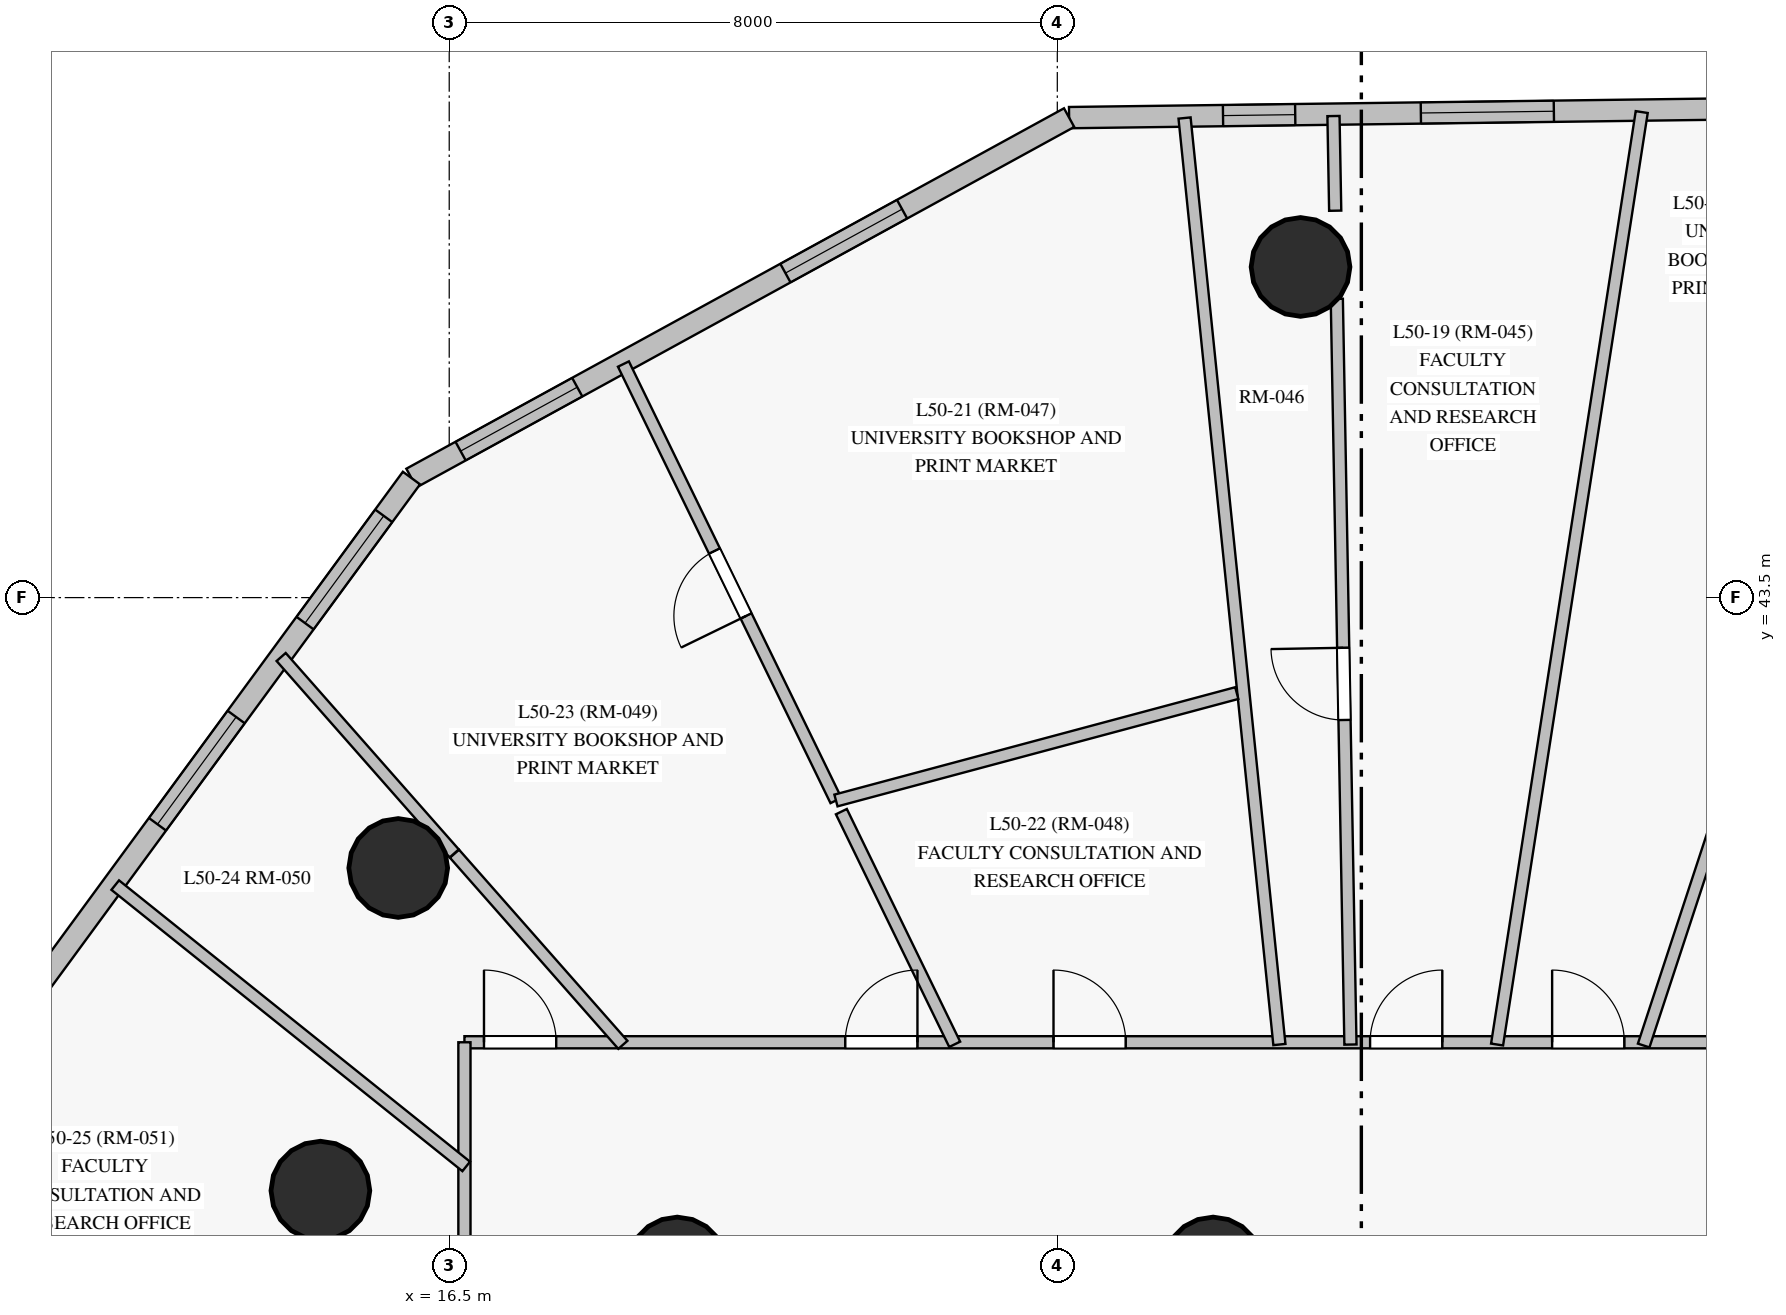
"""IFC4 building model, lengths in metres.
Left out: names, types, materials, properties, quantities, classifications, styles, units other than length and angle.
Written with IfcOpenShell. Run it as: python <this file> out.ifc"""

import sys

from ifc_helpers import new_model, si_unit, direction, frame, frame_2d, origin, origin_with_axes, origin_2d, place, context, subcontext, project, spatial, rectangle, circle, extrude, source, transform, mapped, element, fill, save


model = new_model("IFC4")
c1 = context("Model", 3, precision=1e-05, world=origin(), true_north=direction((0.0, 1.0)))
c2 = subcontext(c1, "Body", "Model", "MODEL_VIEW")
j1 = project(units=[si_unit("LENGTHUNIT", "METRE"), si_unit("PLANEANGLEUNIT", "RADIAN")], contexts=[c1])
p1 = place(None, origin())
s1 = spatial("IfcSite", under=j1, at=p1, CompositionType="ELEMENT")
p2 = place(p1, origin())
s2 = spatial("IfcBuilding", under=s1, at=p2, CompositionType="ELEMENT")
p3 = place(p2, frame((0.0, 0.0, 174.85)))
s3 = spatial("IfcBuildingStorey", under=s2, at=p3, CompositionType="ELEMENT", Elevation=174.85)
m1 = source(origin_with_axes(), c2, "Body", "SweptSolid", [
    extrude(circle(Radius=0.65, at=origin_2d()), origin(), (0.0, 0.0, 1.0), 3.05),
])
for number, where, z_axis, x_axis in (
    (1, (19.5, 34.7, 0.0), (0.0, 0.0, 1.0), (1.0, 0.0, 0.0)),
    (2, (26.55, 34.7, 0.0), (0.0, 0.0, 1.0), (1.0, 0.0, 0.0)),
    (3, (27.7, 47.85, 0.0), (0.0, 0.0, 1.0), (1.0, 0.0, 0.0)),
    (4, (15.829, 39.943, 0.0), (0.0, 0.0, 1.0), (1.0, 0.0, 0.0)),
    (5, (14.805, 35.698, 0.0), (0.0, 0.0, 1.0), (1.0, 0.0, 0.0)),
):
    element("IfcColumn", number, at=place(p3, frame(where, z_axis=z_axis, x_axis=x_axis)), inside=s3, PredefinedType="COLUMN", context=c2, shape_type="MappedRepresentation", body=[
        mapped(m1, transform((0.0, 0.0, 0.0), scale=1.0)),
    ])
p4 = place(p3, frame((37.189, 49.979, 0.0), z_axis=(0.0, 0.0, 1.0), x_axis=(-0.999913830064, -0.013127545317, 0.0)))
e6 = element("IfcWall", 6, at=p4, inside=s3, PredefinedType="SOLIDWALL", context=c2, shape_type="SweptSolid", body=[
    extrude(rectangle(XDim=12.535, YDim=0.28, at=frame_2d((6.267, 0.0))), origin(), (0.0, 0.0, 1.0), 2.825),
])
p5 = place(p4, frame((2.095, 0.0, 0.85)))
e7 = element("IfcOpeningElement", 7, at=p5, cuts=e6, PredefinedType="OPENING", context=c2, shape_type="SweptSolid", body=[
    extrude(rectangle(XDim=1.75, YDim=1.65, at=frame_2d((0.875, 0.825))), frame((0.0, 0.15, 0.0), z_axis=(0.0, -1.0, 0.0), x_axis=(1.0, 0.0, 0.0)), (0.0, 0.0, 1.0), 0.3),
])
p6 = place(p4, frame((6.157, 0.0, 0.85)))
e8 = element("IfcOpeningElement", 8, at=p6, cuts=e6, PredefinedType="OPENING", context=c2, shape_type="SweptSolid", body=[
    extrude(rectangle(XDim=1.75, YDim=1.65, at=frame_2d((0.875, 0.825))), frame((0.0, 0.15, 0.0), z_axis=(0.0, -1.0, 0.0), x_axis=(1.0, 0.0, 0.0)), (0.0, 0.0, 1.0), 0.3),
])
p7 = place(p4, frame((9.56, 0.0, 0.85)))
e9 = element("IfcOpeningElement", 9, at=p7, cuts=e6, PredefinedType="OPENING", context=c2, shape_type="SweptSolid", body=[
    extrude(rectangle(XDim=0.95, YDim=1.5, at=frame_2d((0.475, 0.75))), frame((0.0, 0.15, 0.0), z_axis=(0.0, -1.0, 0.0), x_axis=(1.0, 0.0, 0.0)), (0.0, 0.0, 1.0), 0.3),
])
p8 = place(p3, frame((24.656, 49.815, 0.0), z_axis=(0.0, 0.0, 1.0), x_axis=(-0.876946311872, -0.480588354097, 0.0)))
e10 = element("IfcWall", 10, at=p8, inside=s3, PredefinedType="SOLIDWALL", context=c2, shape_type="SweptSolid", body=[
    extrude(rectangle(XDim=9.866, YDim=0.28, at=frame_2d((4.933, 0.0))), origin(), (0.0, 0.0, 1.0), 2.825),
])
p9 = place(p8, frame((2.506, 0.0, 0.85)))
e11 = element("IfcOpeningElement", 11, at=p9, cuts=e10, PredefinedType="OPENING", context=c2, shape_type="SweptSolid", body=[
    extrude(rectangle(XDim=1.75, YDim=1.65, at=frame_2d((0.875, 0.825))), frame((0.0, 0.15, 0.0), z_axis=(0.0, -1.0, 0.0), x_axis=(1.0, 0.0, 0.0)), (0.0, 0.0, 1.0), 0.3),
])
p10 = place(p8, frame((7.379, 0.0, 0.85)))
e12 = element("IfcOpeningElement", 12, at=p10, cuts=e10, PredefinedType="OPENING", context=c2, shape_type="SweptSolid", body=[
    extrude(rectangle(XDim=1.75, YDim=1.65, at=frame_2d((0.875, 0.825))), frame((0.0, 0.15, 0.0), z_axis=(0.0, -1.0, 0.0), x_axis=(1.0, 0.0, 0.0)), (0.0, 0.0, 1.0), 0.3),
])
p11 = place(p3, frame((16.003, 45.073, 0.0), z_axis=(0.0, 0.0, 1.0), x_axis=(-0.591484690677, -0.806316228718, 0.0)))
e13 = element("IfcWall", 13, at=p11, inside=s3, PredefinedType="SOLIDWALL", context=c2, shape_type="SweptSolid", body=[
    extrude(rectangle(XDim=13.904, YDim=0.28, at=frame_2d((6.952, 0.0))), origin(), (0.0, 0.0, 1.0), 2.825),
])
p12 = place(p11, frame((0.617, 0.0, 0.85)))
e14 = element("IfcOpeningElement", 14, at=p12, cuts=e13, PredefinedType="OPENING", context=c2, shape_type="SweptSolid", body=[
    extrude(rectangle(XDim=1.75, YDim=1.65, at=frame_2d((0.875, 0.825))), frame((0.0, 0.15, 0.0), z_axis=(0.0, -1.0, 0.0), x_axis=(1.0, 0.0, 0.0)), (0.0, 0.0, 1.0), 0.3),
])
p13 = place(p11, frame((3.899, 0.0, 0.85)))
e15 = element("IfcOpeningElement", 15, at=p13, cuts=e13, PredefinedType="OPENING", context=c2, shape_type="SweptSolid", body=[
    extrude(rectangle(XDim=1.75, YDim=1.65, at=frame_2d((0.875, 0.825))), frame((0.0, 0.15, 0.0), z_axis=(0.0, -1.0, 0.0), x_axis=(1.0, 0.0, 0.0)), (0.0, 0.0, 1.0), 0.3),
])
p14 = place(p11, frame((8.644, 0.0, 0.85)))
e16 = element("IfcOpeningElement", 16, at=p14, cuts=e13, PredefinedType="OPENING", context=c2, shape_type="SweptSolid", body=[
    extrude(rectangle(XDim=1.75, YDim=1.65, at=frame_2d((0.875, 0.825))), frame((0.0, 0.15, 0.0), z_axis=(0.0, -1.0, 0.0), x_axis=(1.0, 0.0, 0.0)), (0.0, 0.0, 1.0), 0.3),
])
p15 = place(p3, frame((16.7, 37.65, 0.0), z_axis=(0.0, 0.0, 1.0), x_axis=(1.0, 0.0, 0.0)))
e17 = element("IfcWall", 17, at=p15, inside=s3, PredefinedType="PARTITIONING", context=c2, shape_type="SweptSolid", body=[
    extrude(rectangle(XDim=23.5, YDim=0.16, at=frame_2d((11.75, 0.0))), origin(), (0.0, 0.0, 1.0), 2.375),
])
p16 = place(p15, frame((17.15, 0.0, 0.0)))
e18 = element("IfcOpeningElement", 18, at=p16, cuts=e17, PredefinedType="OPENING", context=c2, shape_type="SweptSolid", body=[
    extrude(rectangle(XDim=0.95, YDim=2.15, at=frame_2d((0.475, 1.075))), frame((0.0, 0.09, 0.0), z_axis=(0.0, -1.0, 0.0), x_axis=(1.0, 0.0, 0.0)), (0.0, 0.0, 1.0), 0.18),
])
p17 = place(p15, frame((14.31, 0.0, 0.0)))
e19 = element("IfcOpeningElement", 19, at=p17, cuts=e17, PredefinedType="OPENING", context=c2, shape_type="SweptSolid", body=[
    extrude(rectangle(XDim=0.95, YDim=2.15, at=frame_2d((0.475, 1.075))), frame((0.0, 0.09, 0.0), z_axis=(0.0, -1.0, 0.0), x_axis=(1.0, 0.0, 0.0)), (0.0, 0.0, 1.0), 0.18),
])
p18 = place(p15, frame((11.915, 0.0, 0.0)))
e20 = element("IfcOpeningElement", 20, at=p18, cuts=e17, PredefinedType="OPENING", context=c2, shape_type="SweptSolid", body=[
    extrude(rectangle(XDim=0.95, YDim=2.15, at=frame_2d((0.475, 1.075))), frame((0.0, 0.09, 0.0), z_axis=(0.0, -1.0, 0.0), x_axis=(1.0, 0.0, 0.0)), (0.0, 0.0, 1.0), 0.18),
])
p19 = place(p15, frame((7.75, 0.0, 0.0)))
e21 = element("IfcOpeningElement", 21, at=p19, cuts=e17, PredefinedType="OPENING", context=c2, shape_type="SweptSolid", body=[
    extrude(rectangle(XDim=0.95, YDim=2.15, at=frame_2d((0.475, 1.075))), frame((0.0, 0.09, 0.0), z_axis=(0.0, -1.0, 0.0), x_axis=(1.0, 0.0, 0.0)), (0.0, 0.0, 1.0), 0.18),
])
p20 = place(p15, frame((5.01, 0.0, 0.0)))
e22 = element("IfcOpeningElement", 22, at=p20, cuts=e17, PredefinedType="OPENING", context=c2, shape_type="SweptSolid", body=[
    extrude(rectangle(XDim=0.95, YDim=2.15, at=frame_2d((0.475, 1.075))), frame((0.0, 0.09, 0.0), z_axis=(0.0, -1.0, 0.0), x_axis=(1.0, 0.0, 0.0)), (0.0, 0.0, 1.0), 0.18),
])
p21 = place(p15, frame((0.257, 0.0, 0.0)))
e23 = element("IfcOpeningElement", 23, at=p21, cuts=e17, PredefinedType="OPENING", context=c2, shape_type="SweptSolid", body=[
    extrude(rectangle(XDim=0.95, YDim=2.15, at=frame_2d((0.475, 1.075))), frame((0.0, 0.09, 0.0), z_axis=(0.0, -1.0, 0.0), x_axis=(1.0, 0.0, 0.0)), (0.0, 0.0, 1.0), 0.18),
])
p22 = place(p3, frame((16.7, 15.35, 0.0), z_axis=(0.0, 0.0, 1.0), x_axis=(0.0, 1.0, 0.0)))
e24 = element("IfcWall", 24, at=p22, inside=s3, PredefinedType="PARTITIONING", context=c2, shape_type="SweptSolid", body=[
    extrude(rectangle(XDim=22.3, YDim=0.16, at=frame_2d((11.15, 0.0))), origin(), (0.0, 0.0, 1.0), 2.275),
])
p23 = place(p22, frame((7.33, 0.0, 0.0)))
e25 = element("IfcOpeningElement", 25, at=p23, cuts=e24, PredefinedType="OPENING", context=c2, shape_type="SweptSolid", body=[
    extrude(rectangle(XDim=0.95, YDim=2.15, at=frame_2d((0.475, 1.075))), frame((0.0, 0.09, 0.0), z_axis=(0.0, -1.0, 0.0), x_axis=(1.0, 0.0, 0.0)), (0.0, 0.0, 1.0), 0.18),
])
p24 = place(p22, frame((5.1, 0.0, 0.0)))
e26 = element("IfcOpeningElement", 26, at=p24, cuts=e24, PredefinedType="OPENING", context=c2, shape_type="SweptSolid", body=[
    extrude(rectangle(XDim=0.96, YDim=2.15, at=frame_2d((0.48, 1.075))), frame((0.0, 0.09, 0.0), z_axis=(0.0, -1.0, 0.0), x_axis=(1.0, 0.0, 0.0)), (0.0, 0.0, 1.0), 0.18),
])
p25 = place(p22, frame((16.64, 0.0, 0.0)))
e27 = element("IfcOpeningElement", 27, at=p25, cuts=e24, PredefinedType="OPENING", context=c2, shape_type="SweptSolid", body=[
    extrude(rectangle(XDim=0.95, YDim=2.15, at=frame_2d((0.475, 1.075))), frame((0.0, 0.09, 0.0), z_axis=(0.0, -1.0, 0.0), x_axis=(1.0, 0.0, 0.0)), (0.0, 0.0, 1.0), 0.18),
])
p26 = place(p22, frame((11.315, 0.0, 0.0)))
e28 = element("IfcOpeningElement", 28, at=p26, cuts=e24, PredefinedType="OPENING", context=c2, shape_type="SweptSolid", body=[
    extrude(rectangle(XDim=0.95, YDim=2.15, at=frame_2d((0.475, 1.075))), frame((0.0, 0.09, 0.0), z_axis=(0.0, -1.0, 0.0), x_axis=(1.0, 0.0, 0.0)), (0.0, 0.0, 1.0), 0.18),
])
p27 = place(p3, frame((30.286, 37.62, 0.0), z_axis=(0.0, 0.0, 1.0), x_axis=(0.153299914958, 0.98817970839, 0.0)))
e29 = element("IfcWall", 29, at=p27, inside=s3, PredefinedType="PARTITIONING", context=c2, shape_type="SweptSolid", body=[
    extrude(rectangle(XDim=12.414, YDim=0.16, at=frame_2d((6.207, 0.0))), origin(), (0.0, 0.0, 1.0), 2.825),
])
p28 = place(p3, frame((27.422, 37.62, 0.0), z_axis=(0.0, 0.0, 1.0), x_axis=(-0.101837248068, 0.994801073032, 0.0)))
e30 = element("IfcWall", 30, at=p28, inside=s3, PredefinedType="PARTITIONING", context=c2, shape_type="SweptSolid", body=[
    extrude(rectangle(XDim=12.253, YDim=0.16, at=frame_2d((6.126, 0.0))), origin(), (0.0, 0.0, 1.0), 2.275),
])
p29 = place(p3, frame((28.357, 37.62, 0.0), z_axis=(0.0, 0.0, 1.0), x_axis=(-0.018288713091, 0.9998327475, 0.0)))
e31 = element("IfcWall", 31, at=p29, inside=s3, PredefinedType="PARTITIONING", context=c2, shape_type="SweptSolid", body=[
    extrude(rectangle(XDim=9.812, YDim=0.16, at=frame_2d((4.906, 0.0))), origin(), (0.0, 0.0, 1.0), 2.275),
])
p30 = place(p29, frame((4.271, 0.0, 0.0)))
e32 = element("IfcOpeningElement", 32, at=p30, cuts=e31, PredefinedType="OPENING", context=c2, shape_type="SweptSolid", body=[
    extrude(rectangle(XDim=0.95, YDim=2.15, at=frame_2d((0.475, 1.075))), frame((0.0, 0.09, 0.0), z_axis=(0.0, -1.0, 0.0), x_axis=(1.0, 0.0, 0.0)), (0.0, 0.0, 1.0), 0.18),
])
p31 = place(p3, frame((16.728, 31.599, 0.0), z_axis=(0.0, 0.0, 1.0), x_axis=(-0.919460607176, 0.393182135723, 0.0)))
e33 = element("IfcWall", 33, at=p31, inside=s3, PredefinedType="PARTITIONING", context=c2, shape_type="SweptSolid", body=[
    extrude(rectangle(XDim=8.755, YDim=0.16, at=frame_2d((4.377, 0.0))), origin(), (0.0, 0.0, 1.0), 2.825),
])
p32 = place(p3, frame((21.588, 40.831, 0.0), z_axis=(0.0, 0.0, 1.0), x_axis=(-0.437830783971, 0.899057397838, 0.0)))
e34 = element("IfcWall", 34, at=p32, inside=s3, PredefinedType="PARTITIONING", context=c2, shape_type="SweptSolid", body=[
    extrude(rectangle(XDim=6.386, YDim=0.16, at=frame_2d((3.193, 0.0))), origin(), (0.0, 0.0, 1.0), 2.825),
])
p33 = place(p32, frame((2.701, 0.0, 0.0)))
e35 = element("IfcOpeningElement", 35, at=p33, cuts=e34, PredefinedType="OPENING", context=c2, shape_type="SweptSolid", body=[
    extrude(rectangle(XDim=0.95, YDim=2.15, at=frame_2d((0.475, 1.075))), frame((0.0, 0.09, 0.0), z_axis=(0.0, -1.0, 0.0), x_axis=(1.0, 0.0, 0.0)), (0.0, 0.0, 1.0), 0.18),
])
p34 = place(p3, frame((16.723, 36.017, 0.0), z_axis=(0.0, 0.0, 1.0), x_axis=(-0.780288897002, 0.625419249157, 0.0)))
e36 = element("IfcWall", 36, at=p34, inside=s3, PredefinedType="PARTITIONING", context=c2, shape_type="SweptSolid", body=[
    extrude(rectangle(XDim=5.918, YDim=0.16, at=frame_2d((2.959, 0.0))), origin(), (0.0, 0.0, 1.0), 2.825),
])
p35 = place(p3, frame((26.861, 42.244, 0.0), z_axis=(0.0, 0.0, 1.0), x_axis=(-0.965933680277, -0.258789731841, 0.0)))
e37 = element("IfcWall", 37, at=p35, inside=s3, PredefinedType="PARTITIONING", context=c2, shape_type="SweptSolid", body=[
    extrude(rectangle(XDim=5.459, YDim=0.16, at=frame_2d((2.73, 0.0))), origin(), (0.0, 0.0, 1.0), 2.375),
])
p36 = place(p3, frame((32.214, 37.607, 0.0), z_axis=(0.0, 0.0, 1.0), x_axis=(0.312337810946, 0.949971100536, 0.0)))
e38 = element("IfcWall", 38, at=p36, inside=s3, PredefinedType="PARTITIONING", context=c2, shape_type="SweptSolid", body=[
    extrude(rectangle(XDim=3.787, YDim=0.16, at=frame_2d((1.894, 0.0))), origin(), (0.0, 0.0, 1.0), 2.825),
])
p37 = place(p3, frame((23.15, 37.623, 0.0), z_axis=(0.0, 0.0, 1.0), x_axis=(-0.437810430728, 0.899067309352, 0.0)))
e39 = element("IfcWall", 39, at=p37, inside=s3, PredefinedType="PARTITIONING", context=c2, shape_type="SweptSolid", body=[
    extrude(rectangle(XDim=3.405, YDim=0.16, at=frame_2d((1.703, 0.0))), origin(), (0.0, 0.0, 1.0), 2.825),
])
p38 = place(p3, frame((18.785, 37.616, 0.0), z_axis=(0.0, 0.0, 1.0), x_axis=(-0.66112037689, 0.750279845964, 0.0)))
e40 = element("IfcWall", 40, at=p38, inside=s3, PredefinedType="PARTITIONING", context=c2, shape_type="SweptSolid", body=[
    extrude(rectangle(XDim=3.352, YDim=0.16, at=frame_2d((1.676, 0.0))), origin(), (0.0, 0.0, 1.0), 2.825),
])
p39 = place(p3, frame((16.566, 40.135, 0.0), z_axis=(0.0, 0.0, 1.0), x_axis=(-0.661110365764, 0.750288667301, 0.0)))
e41 = element("IfcWall", 41, at=p39, inside=s3, PredefinedType="PARTITIONING", context=c2, shape_type="SweptSolid", body=[
    extrude(rectangle(XDim=3.444, YDim=0.16, at=frame_2d((1.722, 0.0))), origin(), (0.0, 0.0, 1.0), 2.825),
])
p40 = place(p3, frame((28.156, 48.59, 0.0), z_axis=(0.0, 0.0, 1.0), x_axis=(-0.018232263019, 0.999833778478, 0.0)))
e42 = element("IfcWall", 42, at=p40, inside=s3, PredefinedType="PARTITIONING", context=c2, shape_type="SweptSolid", body=[
    extrude(rectangle(XDim=1.245, YDim=0.16, at=frame_2d((0.623, 0.0))), origin(), (0.0, 0.0, 1.0), 2.825),
])
m2 = source(origin_with_axes(), c2, "Body", "SweptSolid", [
    extrude(rectangle(XDim=1.75, YDim=1.65, at=frame_2d((0.875, 0.825))), frame((0.0, 0.03, 0.0), z_axis=(0.0, -1.0, 0.0), x_axis=(1.0, 0.0, 0.0)), (0.0, 0.0, 1.0), 0.06),
])
p41 = place(p6, origin())
e43 = element("IfcWindow", 43, at=p41, inside=s3, PartitioningType="SINGLE_PANEL", PredefinedType="WINDOW", context=c2, shape_type="MappedRepresentation", body=[
    mapped(m2, transform((0.0, 0.0, 0.0), scale=1.0)),
])
fill(e8, e43)
m3 = source(origin_with_axes(), c2, "Body", "SweptSolid", [
    extrude(rectangle(XDim=0.95, YDim=1.5, at=frame_2d((0.475, 0.75))), frame((0.0, 0.03, 0.0), z_axis=(0.0, -1.0, 0.0), x_axis=(1.0, 0.0, 0.0)), (0.0, 0.0, 1.0), 0.06),
])
p42 = place(p7, origin())
e44 = element("IfcWindow", 44, at=p42, inside=s3, PartitioningType="SINGLE_PANEL", PredefinedType="WINDOW", context=c2, shape_type="MappedRepresentation", body=[
    mapped(m3, transform((0.0, 0.0, 0.0), scale=1.0)),
])
fill(e9, e44)
p43 = place(p9, origin())
e45 = element("IfcWindow", 45, at=p43, inside=s3, PartitioningType="SINGLE_PANEL", PredefinedType="WINDOW", context=c2, shape_type="MappedRepresentation", body=[
    mapped(m2, transform((0.0, 0.0, 0.0), scale=1.0)),
])
fill(e11, e45)
p44 = place(p10, origin())
e46 = element("IfcWindow", 46, at=p44, inside=s3, PartitioningType="SINGLE_PANEL", PredefinedType="WINDOW", context=c2, shape_type="MappedRepresentation", body=[
    mapped(m2, transform((0.0, 0.0, 0.0), scale=1.0)),
])
fill(e12, e46)
p45 = place(p12, origin())
e47 = element("IfcWindow", 47, at=p45, inside=s3, PartitioningType="SINGLE_PANEL", PredefinedType="WINDOW", context=c2, shape_type="MappedRepresentation", body=[
    mapped(m2, transform((0.0, 0.0, 0.0), scale=1.0)),
])
fill(e14, e47)
p46 = place(p13, origin())
e48 = element("IfcWindow", 48, at=p46, inside=s3, PartitioningType="SINGLE_PANEL", PredefinedType="WINDOW", context=c2, shape_type="MappedRepresentation", body=[
    mapped(m2, transform((0.0, 0.0, 0.0), scale=1.0)),
])
fill(e15, e48)
m4 = source(origin_with_axes(), c2, "Body", "SweptSolid", [
    extrude(rectangle(XDim=0.95, YDim=2.15, at=frame_2d((0.475, 1.075))), frame((0.0, 0.025, 0.0), z_axis=(0.0, -1.0, 0.0), x_axis=(1.0, 0.0, 0.0)), (0.0, 0.0, 1.0), 0.05),
])
p47 = place(p17, origin())
e49 = element("IfcDoor", 49, at=p47, inside=s3, OperationType="SINGLE_SWING_LEFT", PredefinedType="DOOR", context=c2, shape_type="MappedRepresentation", body=[
    mapped(m4, transform((0.0, 0.0, 0.0), scale=1.0)),
])
fill(e19, e49)
p48 = place(p18, origin())
e50 = element("IfcDoor", 50, at=p48, inside=s3, OperationType="SINGLE_SWING_RIGHT", PredefinedType="DOOR", context=c2, shape_type="MappedRepresentation", body=[
    mapped(m4, transform((0.0, 0.0, 0.0), scale=1.0)),
])
fill(e20, e50)
p49 = place(p19, origin())
e51 = element("IfcDoor", 51, at=p49, inside=s3, OperationType="SINGLE_SWING_LEFT", PredefinedType="DOOR", context=c2, shape_type="MappedRepresentation", body=[
    mapped(m4, transform((0.0, 0.0, 0.0), scale=1.0)),
])
fill(e21, e51)
p50 = place(p20, origin())
e52 = element("IfcDoor", 52, at=p50, inside=s3, OperationType="SINGLE_SWING_RIGHT", PredefinedType="DOOR", context=c2, shape_type="MappedRepresentation", body=[
    mapped(m4, transform((0.0, 0.0, 0.0), scale=1.0)),
])
fill(e22, e52)
p51 = place(p21, origin())
e53 = element("IfcDoor", 53, at=p51, inside=s3, OperationType="SINGLE_SWING_LEFT", PredefinedType="DOOR", context=c2, shape_type="MappedRepresentation", body=[
    mapped(m4, transform((0.0, 0.0, 0.0), scale=1.0)),
])
fill(e23, e53)
p52 = place(p30, origin())
e54 = element("IfcDoor", 54, at=p52, inside=s3, OperationType="SINGLE_SWING_RIGHT", PredefinedType="DOOR", context=c2, shape_type="MappedRepresentation", body=[
    mapped(m4, transform((0.0, 0.0, 0.0), scale=1.0)),
])
fill(e32, e54)
p53 = place(p33, origin())
e55 = element("IfcDoor", 55, at=p53, inside=s3, OperationType="SINGLE_SWING_LEFT", PredefinedType="DOOR", context=c2, shape_type="MappedRepresentation", body=[
    mapped(m4, transform((0.0, 0.0, 0.0), scale=1.0)),
])
fill(e35, e55)
save(model, sys.argv[1])
